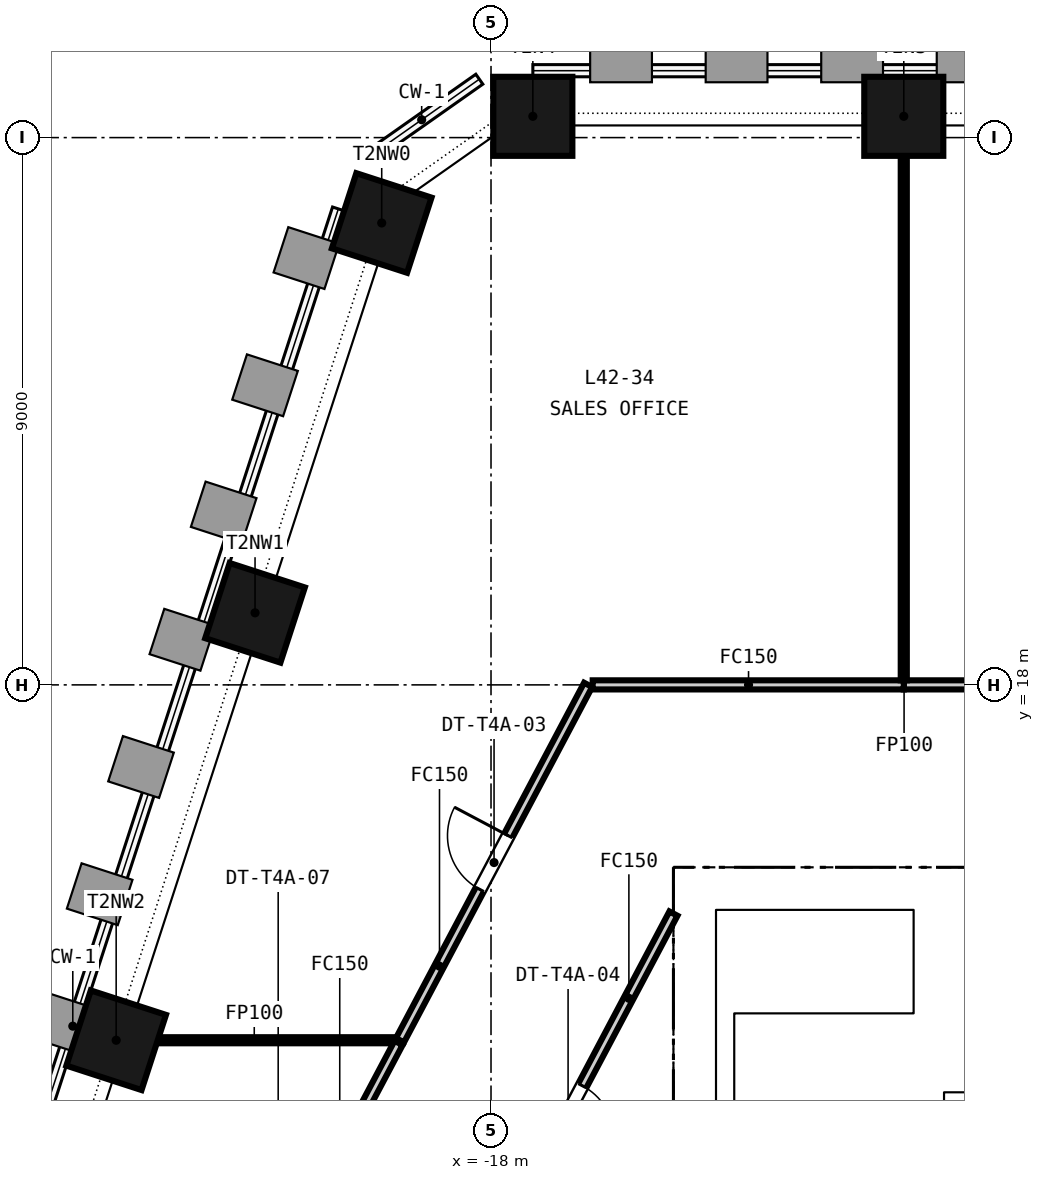
"""IFC4 building model, lengths in metres.
Left out: names, types, materials, properties, quantities, classifications, styles, units other than length and angle.
Written with IfcOpenShell. Run it as: python <this file> out.ifc"""

import sys

from ifc_helpers import new_model, si_unit, direction, frame, frame_2d, origin, origin_2d, place, context, subcontext, project, spatial, rectangle, extrude, element, fill, save


model = new_model("IFC4")
c1 = context("Model", 3, precision=1e-05, world=origin(), true_north=direction((0.0, 1.0)))
c2 = subcontext(c1, "Body", "Model", "MODEL_VIEW")
j1 = project(units=[si_unit("LENGTHUNIT", "METRE"), si_unit("PLANEANGLEUNIT", "RADIAN")], contexts=[c1])
p1 = place(None, origin())
s1 = spatial("IfcSite", under=j1, at=p1, CompositionType="ELEMENT")
p2 = place(p1, origin())
s2 = spatial("IfcBuilding", under=s1, at=p2, CompositionType="ELEMENT")
p3 = place(p2, frame((0.0, 0.0, 170.8)))
s3 = spatial("IfcBuildingStorey", under=s2, at=p3, CompositionType="ELEMENT", Elevation=170.8)
p4 = place(p3, frame((-15.0, 14.65, -0.15), z_axis=(0.0, 0.0, 1.0), x_axis=(1.0, 0.0, 0.0)))
e1 = element("IfcWall", 1, at=p4, inside=s3, PredefinedType="SOLIDWALL", context=c2, shape_type="SweptSolid", body=[
    extrude(rectangle(XDim=30.0, YDim=0.7, at=frame_2d((15.0, 0.0))), origin(), (0.0, 0.0, 1.0), 3.65),
])
p5 = place(p4, frame((9.25, 0.0, 0.15)))
e2 = element("IfcOpeningElement", 2, at=p5, cuts=e1, PredefinedType="OPENING", context=c2, shape_type="SweptSolid", body=[
    extrude(rectangle(XDim=1.5, YDim=2.1, at=frame_2d((0.75, 1.05))), frame((0.0, 0.36, 0.0), z_axis=(0.0, -1.0, 0.0), x_axis=(1.0, 0.0, 0.0)), (0.0, 0.0, 1.0), 0.72),
])
p6 = place(p4, frame((19.4, 0.0, 0.15)))
e3 = element("IfcOpeningElement", 3, at=p6, cuts=e1, PredefinedType="OPENING", context=c2, shape_type="SweptSolid", body=[
    extrude(rectangle(XDim=1.5, YDim=2.1, at=frame_2d((0.75, 1.05))), frame((0.0, 0.36, 0.0), z_axis=(0.0, -1.0, 0.0), x_axis=(1.0, 0.0, 0.0)), (0.0, 0.0, 1.0), 0.72),
])
p7 = place(p4, frame((1.5, 0.0, 0.15)))
e4 = element("IfcOpeningElement", 4, at=p7, cuts=e1, PredefinedType="OPENING", context=c2, shape_type="SweptSolid", body=[
    extrude(rectangle(XDim=1.2, YDim=2.1, at=frame_2d((0.6, 1.05))), frame((0.0, 0.36, 0.0), z_axis=(0.0, -1.0, 0.0), x_axis=(1.0, 0.0, 0.0)), (0.0, 0.0, 1.0), 0.72),
])
p8 = place(p4, frame((27.3, 0.0, 0.15)))
e5 = element("IfcOpeningElement", 5, at=p8, cuts=e1, PredefinedType="OPENING", context=c2, shape_type="SweptSolid", body=[
    extrude(rectangle(XDim=1.2, YDim=2.1, at=frame_2d((0.6, 1.05))), frame((0.0, 0.36, 0.0), z_axis=(0.0, -1.0, 0.0), x_axis=(1.0, 0.0, 0.0)), (0.0, 0.0, 1.0), 0.72),
])
p9 = place(p3, frame((-14.65, 0.7, -0.15), z_axis=(0.0, 0.0, 1.0), x_axis=(0.0, 1.0, 0.0)))
e6 = element("IfcWall", 6, at=p9, inside=s3, PredefinedType="SOLIDWALL", context=c2, shape_type="SweptSolid", body=[
    extrude(rectangle(XDim=13.6, YDim=0.7, at=frame_2d((6.8, 0.0))), origin(), (0.0, 0.0, 1.0), 3.65),
])
p10 = place(p3, frame((-10.8, 0.7, -0.15), z_axis=(0.0, 0.0, 1.0), x_axis=(0.0, 1.0, 0.0)))
e7 = element("IfcWall", 7, at=p10, inside=s3, PredefinedType="SOLIDWALL", context=c2, shape_type="SweptSolid", body=[
    extrude(rectangle(XDim=13.6, YDim=0.5, at=frame_2d((6.8, 0.0))), origin(), (0.0, 0.0, 1.0), 3.65),
])
for number, where, z_axis, x_axis in (
    (8, (-11.212, 27.35, -0.15), (0.0, 0.0, 1.0), (-1.0, 0.0, 0.0)),
    (9, (-17.312, 27.35, -0.15), (0.0, 0.0, 1.0), (-1.0, 0.0, 0.0)),
    (10, (-19.798, 25.596, -0.15), (0.0, 0.0, 1.0), (-0.309, -0.951, 0.0)),
    (11, (-21.881, 19.185, -0.15), (0.0, 0.0, 1.0), (-0.309, -0.951, 0.0)),
    (12, (-24.164, 12.156, -0.15), (0.0, 0.0, 1.0), (-0.309, -0.951, 0.0)),
):
    element("IfcColumn", number, at=place(p3, frame(where, z_axis=z_axis, x_axis=x_axis)), inside=s3, PredefinedType="COLUMN", context=c2, shape_type="SweptSolid", body=[
        extrude(rectangle(XDim=1.3, YDim=1.3, at=origin_2d()), origin(), (0.0, 0.0, 1.0), 3.65),
    ])
p11 = place(p3, frame((-10.55, 11.2, 0.0), z_axis=(0.0, 0.0, 1.0), x_axis=(1.0, 0.0, 0.0)))
e13 = element("IfcWall", 13, at=p11, inside=s3, PredefinedType="PARTITIONING", context=c2, shape_type="SweptSolid", body=[
    extrude(rectangle(XDim=4.8, YDim=0.2, at=frame_2d((2.4, 0.0))), origin(), (0.0, 0.0, 1.0), 3.5),
])
p12 = place(p11, frame((0.525, 0.0, 0.0)))
e14 = element("IfcOpeningElement", 14, at=p12, cuts=e13, PredefinedType="OPENING", context=c2, shape_type="SweptSolid", body=[
    extrude(rectangle(XDim=1.1, YDim=2.1, at=frame_2d((0.55, 1.05))), frame((0.0, 0.11, 0.0), z_axis=(0.0, -1.0, 0.0), x_axis=(1.0, 0.0, 0.0)), (0.0, 0.0, 1.0), 0.22),
])
p13 = place(p11, frame((2.925, 0.0, 0.0)))
e15 = element("IfcOpeningElement", 15, at=p13, cuts=e13, PredefinedType="OPENING", context=c2, shape_type="SweptSolid", body=[
    extrude(rectangle(XDim=1.1, YDim=2.1, at=frame_2d((0.55, 1.05))), frame((0.0, 0.11, 0.0), z_axis=(0.0, -1.0, 0.0), x_axis=(1.0, 0.0, 0.0)), (0.0, 0.0, 1.0), 0.22),
])
p14 = place(p3, frame((-14.15, 0.7, 0.0), z_axis=(0.0, 0.0, 1.0), x_axis=(0.0, 1.0, 0.0)))
e16 = element("IfcWall", 16, at=p14, inside=s3, PredefinedType="SOLIDWALL", context=c2, shape_type="SweptSolid", body=[
    extrude(rectangle(XDim=13.6, YDim=0.3, at=frame_2d((6.8, 0.0))), origin(), (0.0, 0.0, 1.0), 3.5),
])
p15 = place(p3, frame((-15.0, 14.239, 0.0), z_axis=(0.0, 0.0, 1.0), x_axis=(-0.467834708812, -0.88381597928, 0.0)))
e17 = element("IfcWall", 17, at=p15, inside=s3, PredefinedType="PARTITIONING", context=c2, shape_type="SweptSolid", body=[
    extrude(rectangle(XDim=7.406, YDim=0.15, at=frame_2d((3.703, 0.0))), origin(), (0.0, 0.0, 1.0), 2.741),
])
p16 = place(p15, frame((3.203, 0.0, 0.0)))
e18 = element("IfcOpeningElement", 18, at=p16, cuts=e17, PredefinedType="OPENING", context=c2, shape_type="SweptSolid", body=[
    extrude(rectangle(XDim=1.0, YDim=2.1, at=frame_2d((0.5, 1.05))), frame((0.0, 0.085, 0.0), z_axis=(0.0, -1.0, 0.0), x_axis=(1.0, 0.0, 0.0)), (0.0, 0.0, 1.0), 0.17),
])
p17 = place(p3, frame((-11.212, 18.0, 0.0), z_axis=(0.0, 0.0, 1.0), x_axis=(1.0, 0.0, 0.0)))
e19 = element("IfcWall", 19, at=p17, inside=s3, PredefinedType="PARTITIONING", context=c2, shape_type="SweptSolid", body=[
    extrude(rectangle(XDim=13.712, YDim=0.15, at=frame_2d((6.856, 0.0))), origin(), (0.0, 0.0, 1.0), 2.741),
])
p18 = place(p17, frame((6.356, 0.0, 0.0)))
e20 = element("IfcOpeningElement", 20, at=p18, cuts=e19, PredefinedType="OPENING", context=c2, shape_type="SweptSolid", body=[
    extrude(rectangle(XDim=1.0, YDim=2.1, at=frame_2d((0.5, 1.05))), frame((0.0, 0.085, 0.0), z_axis=(0.0, -1.0, 0.0), x_axis=(1.0, 0.0, 0.0)), (0.0, 0.0, 1.0), 0.17),
])
p19 = place(p3, frame((-19.497, 12.156, 0.0), z_axis=(0.0, 0.0, 1.0), x_axis=(0.467901291368, 0.883780731593, 0.0)))
e21 = element("IfcWall", 21, at=p19, inside=s3, PredefinedType="PARTITIONING", context=c2, shape_type="SweptSolid", body=[
    extrude(rectangle(XDim=6.613, YDim=0.15, at=frame_2d((3.306, 0.0))), origin(), (0.0, 0.0, 1.0), 2.741),
])
p20 = place(p19, frame((2.806, 0.0, 0.0)))
e22 = element("IfcOpeningElement", 22, at=p20, cuts=e21, PredefinedType="OPENING", context=c2, shape_type="SweptSolid", body=[
    extrude(rectangle(XDim=1.0, YDim=2.1, at=frame_2d((0.5, 1.05))), frame((0.0, 0.085, 0.0), z_axis=(0.0, -1.0, 0.0), x_axis=(1.0, 0.0, 0.0)), (0.0, 0.0, 1.0), 0.17),
])
p21 = place(p3, frame((-16.328, 18.0, 0.0), z_axis=(0.0, 0.0, 1.0), x_axis=(1.0, 0.0, 0.0)))
e23 = element("IfcWall", 23, at=p21, inside=s3, PredefinedType="PARTITIONING", context=c2, shape_type="SweptSolid", body=[
    extrude(rectangle(XDim=5.116, YDim=0.15, at=frame_2d((2.558, 0.0))), origin(), (0.0, 0.0, 1.0), 2.741),
])
p22 = place(p3, frame((-11.212, 18.075, 0.0), z_axis=(0.0, 0.0, 1.0), x_axis=(0.0, 1.0, 0.0)))
e24 = element("IfcWall", 24, at=p22, inside=s3, PredefinedType="PARTITIONING", context=c2, shape_type="SweptSolid", body=[
    extrude(rectangle(XDim=9.325, YDim=0.1, at=frame_2d((4.663, 0.0))), origin(), (0.0, 0.0, 1.0), 2.741),
])
p23 = place(p3, frame((-24.217, 12.156, 0.0), z_axis=(0.0, 0.0, 1.0), x_axis=(1.0, 0.0, 0.0)))
e25 = element("IfcWall", 25, at=p23, inside=s3, PredefinedType="PARTITIONING", context=c2, shape_type="SweptSolid", body=[
    extrude(rectangle(XDim=4.637, YDim=0.1, at=frame_2d((2.318, 0.0))), origin(), (0.0, 0.0, 1.0), 2.741),
])
p24 = place(p3, frame((-21.465, 8.439, 0.0), z_axis=(0.0, 0.0, 1.0), x_axis=(0.467890419772, 0.883786487272, 0.0)))
e26 = element("IfcWall", 26, at=p24, inside=s3, PredefinedType="PARTITIONING", context=c2, shape_type="SweptSolid", body=[
    extrude(rectangle(XDim=4.156, YDim=0.15, at=frame_2d((2.078, 0.0))), origin(), (0.0, 0.0, 1.0), 2.741),
])
p25 = place(p7, origin())
e27 = element("IfcDoor", 27, at=p25, inside=s3, OperationType="SINGLE_SWING_RIGHT", PredefinedType="DOOR", context=c2, shape_type="SweptSolid", body=[
    extrude(rectangle(XDim=1.2, YDim=2.1, at=frame_2d((0.6, 1.05))), frame((0.0, 0.025, 0.0), z_axis=(0.0, -1.0, 0.0), x_axis=(1.0, 0.0, 0.0)), (0.0, 0.0, 1.0), 0.05),
])
fill(e4, e27)
p26 = place(p20, origin())
e28 = element("IfcDoor", 28, at=p26, inside=s3, OperationType="SINGLE_SWING_RIGHT", PredefinedType="DOOR", context=c2, shape_type="SweptSolid", body=[
    extrude(rectangle(XDim=1.0, YDim=2.1, at=frame_2d((0.5, 1.05))), frame((0.0, 0.025, 0.0), z_axis=(0.0, -1.0, 0.0), x_axis=(1.0, 0.0, 0.0)), (0.0, 0.0, 1.0), 0.05),
])
fill(e22, e28)
p27 = place(p16, origin())
e29 = element("IfcDoor", 29, at=p27, inside=s3, OperationType="SINGLE_SWING_RIGHT", PredefinedType="DOOR", context=c2, shape_type="SweptSolid", body=[
    extrude(rectangle(XDim=1.0, YDim=2.1, at=frame_2d((0.5, 1.05))), frame((0.0, 0.025, 0.0), z_axis=(0.0, -1.0, 0.0), x_axis=(1.0, 0.0, 0.0)), (0.0, 0.0, 1.0), 0.05),
])
fill(e18, e29)
save(model, sys.argv[1])
